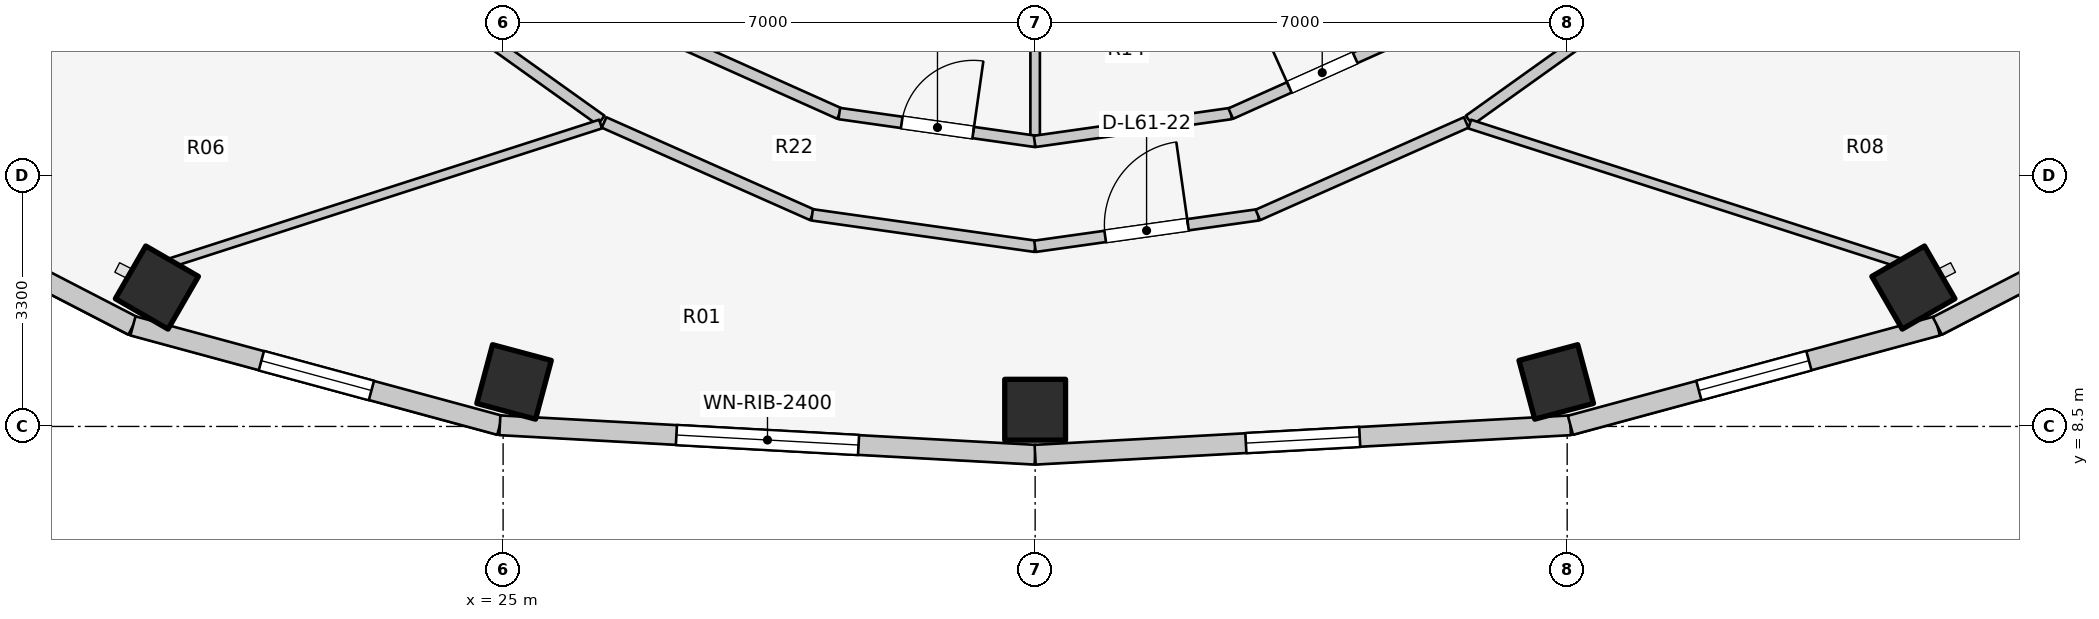
"""IFC4 building model, lengths in metres.
Left out: names, types, materials, properties, quantities, classifications, styles, units other than length and angle.
Written with IfcOpenShell. Run it as: python <this file> out.ifc"""

import sys

from ifc_helpers import new_model, si_unit, direction, frame, frame_2d, origin, origin_2d, place, context, subcontext, project, spatial, rectangle, extrude, element, fill, save


model = new_model("IFC4")
c1 = context("Model", 3, precision=1e-05, world=origin(), true_north=direction((0.0, 1.0)))
c2 = subcontext(c1, "Body", "Model", "MODEL_VIEW")
j1 = project(units=[si_unit("LENGTHUNIT", "METRE"), si_unit("PLANEANGLEUNIT", "RADIAN")], contexts=[c1])
p1 = place(None, origin())
s1 = spatial("IfcSite", under=j1, at=p1, CompositionType="ELEMENT")
p2 = place(p1, origin())
s2 = spatial("IfcBuilding", under=s1, at=p2, CompositionType="ELEMENT")
p3 = place(p2, frame((0.0, 0.0, 201.6)))
s3 = spatial("IfcBuildingStorey", under=s2, at=p3, CompositionType="ELEMENT", Elevation=201.6)
for number, where, z_axis, x_axis in (
    (1, (20.445, 10.327, 0.0), (0.0, 0.0, 1.0), (-0.5, -0.866, 0.0)),
    (2, (25.144, 9.086, 0.0), (0.0, 0.0, 1.0), (-0.259, -0.966, 0.0)),
    (3, (32.0, 8.72, 0.0), (0.0, 0.0, 1.0), (0.0, -1.0, 0.0)),
    (4, (38.856, 9.086, 0.0), (0.0, 0.0, 1.0), (0.259, -0.966, 0.0)),
    (5, (43.555, 10.327, 0.0), (0.0, 0.0, 1.0), (0.5, -0.866, 0.0)),
):
    element("IfcColumn", number, at=place(p3, frame(where, z_axis=z_axis, x_axis=x_axis)), inside=s3, PredefinedType="COLUMN", context=c2, shape_type="SweptSolid", body=[
        extrude(rectangle(XDim=0.8, YDim=0.8, at=origin_2d()), origin(), (0.0, 0.0, 1.0), 3.1),
    ])
p4 = place(p3, frame((16.442, 11.728, 0.0), z_axis=(0.0, 0.0, 1.0), x_axis=(0.88849146803, -0.458893137057, 0.0)))
e6 = element("IfcWall", 6, at=p4, inside=s3, PredefinedType="STANDARD", context=c2, shape_type="SweptSolid", body=[
    extrude(rectangle(XDim=4.15, YDim=0.26, at=frame_2d((2.075, 0.0))), origin(), (0.0, 0.0, 1.0), 2.85),
])
p5 = place(p3, frame((20.13, 9.823, 0.0), z_axis=(0.0, 0.0, 1.0), x_axis=(0.965213026382, -0.261464746576, 0.0)))
e7 = element("IfcWall", 7, at=p5, inside=s3, PredefinedType="STANDARD", context=c2, shape_type="SweptSolid", body=[
    extrude(rectangle(XDim=5.001, YDim=0.26, at=frame_2d((2.5, 0.0))), origin(), (0.0, 0.0, 1.0), 2.85),
])
p6 = place(p5, frame((1.75, 0.0, 0.75)))
e8 = element("IfcOpeningElement", 8, at=p6, cuts=e7, PredefinedType="OPENING", context=c2, shape_type="SweptSolid", body=[
    extrude(rectangle(XDim=1.5, YDim=1.6, at=frame_2d((0.75, 0.8))), frame((0.0, 0.14, 0.0), z_axis=(0.0, -1.0, 0.0), x_axis=(1.0, 0.0, 0.0)), (0.0, 0.0, 1.0), 0.28),
])
p7 = place(p3, frame((24.957, 8.515, 0.0), z_axis=(0.0, 0.0, 1.0), x_axis=(0.998490239527, -0.054929423535, 0.0)))
e9 = element("IfcWall", 9, at=p7, inside=s3, PredefinedType="STANDARD", context=c2, shape_type="SweptSolid", body=[
    extrude(rectangle(XDim=7.054, YDim=0.26, at=frame_2d((3.527, 0.0))), origin(), (0.0, 0.0, 1.0), 2.85),
])
p8 = place(p7, frame((2.327, 0.0, 0.75)))
e10 = element("IfcOpeningElement", 10, at=p8, cuts=e9, PredefinedType="OPENING", context=c2, shape_type="SweptSolid", body=[
    extrude(rectangle(XDim=2.4, YDim=1.7, at=frame_2d((1.2, 0.85))), frame((0.0, 0.14, 0.0), z_axis=(0.0, -1.0, 0.0), x_axis=(1.0, 0.0, 0.0)), (0.0, 0.0, 1.0), 0.28),
])
p9 = place(p3, frame((32.0, 8.128, 0.0), z_axis=(0.0, 0.0, 1.0), x_axis=(0.998490239527, 0.054929423535, 0.0)))
e11 = element("IfcWall", 11, at=p9, inside=s3, PredefinedType="STANDARD", context=c2, shape_type="SweptSolid", body=[
    extrude(rectangle(XDim=7.054, YDim=0.26, at=frame_2d((3.527, 0.0))), origin(), (0.0, 0.0, 1.0), 2.85),
])
p10 = place(p9, frame((2.777, 0.0, 0.75)))
e12 = element("IfcOpeningElement", 12, at=p10, cuts=e11, PredefinedType="OPENING", context=c2, shape_type="SweptSolid", body=[
    extrude(rectangle(XDim=1.5, YDim=1.6, at=frame_2d((0.75, 0.8))), frame((0.0, 0.14, 0.0), z_axis=(0.0, -1.0, 0.0), x_axis=(1.0, 0.0, 0.0)), (0.0, 0.0, 1.0), 0.28),
])
p11 = place(p3, frame((39.043, 8.515, 0.0), z_axis=(0.0, 0.0, 1.0), x_axis=(0.965213026382, 0.261464746576, 0.0)))
e13 = element("IfcWall", 13, at=p11, inside=s3, PredefinedType="STANDARD", context=c2, shape_type="SweptSolid", body=[
    extrude(rectangle(XDim=5.001, YDim=0.26, at=frame_2d((2.5, 0.0))), origin(), (0.0, 0.0, 1.0), 2.85),
])
p12 = place(p11, frame((1.75, 0.0, 0.75)))
e14 = element("IfcOpeningElement", 14, at=p12, cuts=e13, PredefinedType="OPENING", context=c2, shape_type="SweptSolid", body=[
    extrude(rectangle(XDim=1.5, YDim=1.6, at=frame_2d((0.75, 0.8))), frame((0.0, 0.14, 0.0), z_axis=(0.0, -1.0, 0.0), x_axis=(1.0, 0.0, 0.0)), (0.0, 0.0, 1.0), 0.28),
])
p13 = place(p3, frame((43.87, 9.823, 0.0), z_axis=(0.0, 0.0, 1.0), x_axis=(0.88849146803, 0.458893137057, 0.0)))
e15 = element("IfcWall", 15, at=p13, inside=s3, PredefinedType="STANDARD", context=c2, shape_type="SweptSolid", body=[
    extrude(rectangle(XDim=4.15, YDim=0.26, at=frame_2d((2.075, 0.0))), origin(), (0.0, 0.0, 1.0), 2.85),
])
p14 = place(p3, frame((32.0, 14.9, 0.0), z_axis=(0.0, 0.0, 1.0), x_axis=(0.0, -1.0, 0.0)))
e16 = element("IfcWall", 16, at=p14, inside=s3, PredefinedType="PARTITIONING", context=c2, shape_type="SweptSolid", body=[
    extrude(rectangle(XDim=2.65, YDim=0.125, at=frame_2d((1.325, 0.0))), origin(), (0.0, 0.0, 1.0), 2.376),
])
p15 = place(p3, frame((27.019, 13.694, 0.0), z_axis=(0.0, 0.0, 1.0), x_axis=(0.912628408652, -0.408790151203, 0.0)))
e17 = element("IfcWall", 17, at=p15, inside=s3, PredefinedType="PARTITIONING", context=c2, shape_type="SweptSolid", body=[
    extrude(rectangle(XDim=2.638, YDim=0.15, at=frame_2d((1.319, 0.0))), origin(), (0.0, 0.0, 1.0), 2.376),
])
p16 = place(p3, frame((29.423, 12.617, 0.0), z_axis=(0.0, 0.0, 1.0), x_axis=(0.990078185178, -0.140517569133, 0.0)))
e18 = element("IfcWall", 18, at=p16, inside=s3, PredefinedType="PARTITIONING", context=c2, shape_type="SweptSolid", body=[
    extrude(rectangle(XDim=2.61, YDim=0.15, at=frame_2d((1.305, 0.0))), origin(), (0.0, 0.0, 1.0), 2.376),
])
p17 = place(p16, frame((0.83, 0.0, 0.0)))
e19 = element("IfcOpeningElement", 19, at=p17, cuts=e18, PredefinedType="OPENING", context=c2, shape_type="SweptSolid", body=[
    extrude(rectangle(XDim=0.95, YDim=2.1, at=frame_2d((0.475, 1.05))), frame((0.0, 0.085, 0.0), z_axis=(0.0, -1.0, 0.0), x_axis=(1.0, 0.0, 0.0)), (0.0, 0.0, 1.0), 0.17),
])
p18 = place(p3, frame((31.993, 12.25, 0.0), z_axis=(0.0, 0.0, 1.0), x_axis=(0.990078185178, 0.140517569133, 0.0)))
e20 = element("IfcWall", 20, at=p18, inside=s3, PredefinedType="PARTITIONING", context=c2, shape_type="SweptSolid", body=[
    extrude(rectangle(XDim=2.61, YDim=0.15, at=frame_2d((1.305, 0.0))), origin(), (0.0, 0.0, 1.0), 2.376),
])
p19 = place(p3, frame((34.573, 12.616, 0.0), z_axis=(0.0, 0.0, 1.0), x_axis=(0.912628408652, 0.408790151203, 0.0)))
e21 = element("IfcWall", 21, at=p19, inside=s3, PredefinedType="PARTITIONING", context=c2, shape_type="SweptSolid", body=[
    extrude(rectangle(XDim=2.638, YDim=0.15, at=frame_2d((1.319, 0.0))), origin(), (0.0, 0.0, 1.0), 2.376),
])
p20 = place(p19, frame((0.844, 0.0, 0.0)))
e22 = element("IfcOpeningElement", 22, at=p20, cuts=e21, PredefinedType="OPENING", context=c2, shape_type="SweptSolid", body=[
    extrude(rectangle(XDim=0.95, YDim=2.1, at=frame_2d((0.475, 1.05))), frame((0.0, 0.085, 0.0), z_axis=(0.0, -1.0, 0.0), x_axis=(1.0, 0.0, 0.0)), (0.0, 0.0, 1.0), 0.17),
])
for number, where, z_axis, x_axis in (
    (23, (26.29, 12.527, 0.0), (0.0, 0.0, 1.0), (-0.814, 0.581, 0.0)),
    (24, (37.71, 12.527, 0.0), (0.0, 0.0, 1.0), (0.814, 0.581, 0.0)),
):
    element("IfcWall", number, at=place(p3, frame(where, z_axis=z_axis, x_axis=x_axis)), inside=s3, PredefinedType="PARTITIONING", context=c2, shape_type="SweptSolid", body=[
        extrude(rectangle(XDim=2.082, YDim=0.15, at=frame_2d((1.041, 0.0))), origin(), (0.0, 0.0, 1.0), 2.376),
    ])
for number, where, z_axis, x_axis in (
    (25, (26.283, 12.478, 0.0), (0.0, 0.0, 1.0), (-0.952, -0.307, 0.0)),
    (26, (37.717, 12.478, 0.0), (0.0, 0.0, 1.0), (0.952, -0.307, 0.0)),
):
    element("IfcWall", number, at=place(p3, frame(where, z_axis=z_axis, x_axis=x_axis)), inside=s3, PredefinedType="MOVABLE", context=c2, shape_type="SweptSolid", body=[
        extrude(rectangle(XDim=5.934, YDim=0.12, at=frame_2d((2.967, 0.0))), origin(), (0.0, 0.0, 1.0), 2.376),
    ])
p21 = place(p3, frame((26.328, 12.499, 0.0), z_axis=(0.0, 0.0, 1.0), x_axis=(0.914043013008, -0.4056172708, 0.0)))
e27 = element("IfcWall", 27, at=p21, inside=s3, PredefinedType="PARTITIONING", context=c2, shape_type="SweptSolid", body=[
    extrude(rectangle(XDim=2.999, YDim=0.15, at=frame_2d((1.5, 0.0))), origin(), (0.0, 0.0, 1.0), 2.376),
])
p22 = place(p3, frame((29.066, 11.284, 0.0), z_axis=(0.0, 0.0, 1.0), x_axis=(0.990214490255, -0.139553800697, 0.0)))
e28 = element("IfcWall", 28, at=p22, inside=s3, PredefinedType="PARTITIONING", context=c2, shape_type="SweptSolid", body=[
    extrude(rectangle(XDim=2.965, YDim=0.15, at=frame_2d((1.483, 0.0))), origin(), (0.0, 0.0, 1.0), 2.376),
])
p23 = place(p3, frame((31.998, 10.87, 0.0), z_axis=(0.0, 0.0, 1.0), x_axis=(0.990214490255, 0.139553800697, 0.0)))
e29 = element("IfcWall", 29, at=p23, inside=s3, PredefinedType="PARTITIONING", context=c2, shape_type="SweptSolid", body=[
    extrude(rectangle(XDim=2.965, YDim=0.15, at=frame_2d((1.483, 0.0))), origin(), (0.0, 0.0, 1.0), 2.376),
])
p24 = place(p23, frame((0.933, 0.0, 0.0)))
e30 = element("IfcOpeningElement", 30, at=p24, cuts=e29, PredefinedType="OPENING", context=c2, shape_type="SweptSolid", body=[
    extrude(rectangle(XDim=1.1, YDim=2.1, at=frame_2d((0.55, 1.05))), frame((0.0, 0.085, 0.0), z_axis=(0.0, -1.0, 0.0), x_axis=(1.0, 0.0, 0.0)), (0.0, 0.0, 1.0), 0.17),
])
p25 = place(p3, frame((34.93, 11.283, 0.0), z_axis=(0.0, 0.0, 1.0), x_axis=(0.914043013008, 0.4056172708, 0.0)))
e31 = element("IfcWall", 31, at=p25, inside=s3, PredefinedType="PARTITIONING", context=c2, shape_type="SweptSolid", body=[
    extrude(rectangle(XDim=2.999, YDim=0.15, at=frame_2d((1.5, 0.0))), origin(), (0.0, 0.0, 1.0), 2.376),
])
p26 = place(p6, origin())
e32 = element("IfcWindow", 32, at=p26, inside=s3, PartitioningType="SINGLE_PANEL", PredefinedType="WINDOW", context=c2, shape_type="SweptSolid", body=[
    extrude(rectangle(XDim=1.5, YDim=1.6, at=frame_2d((0.75, 0.8))), frame((0.0, 0.03, 0.0), z_axis=(0.0, -1.0, 0.0), x_axis=(1.0, 0.0, 0.0)), (0.0, 0.0, 1.0), 0.06),
])
fill(e8, e32)
p27 = place(p8, origin())
e33 = element("IfcWindow", 33, at=p27, inside=s3, PartitioningType="SINGLE_PANEL", PredefinedType="WINDOW", context=c2, shape_type="SweptSolid", body=[
    extrude(rectangle(XDim=2.4, YDim=1.7, at=frame_2d((1.2, 0.85))), frame((0.0, 0.03, 0.0), z_axis=(0.0, -1.0, 0.0), x_axis=(1.0, 0.0, 0.0)), (0.0, 0.0, 1.0), 0.06),
])
fill(e10, e33)
p28 = place(p10, origin())
e34 = element("IfcWindow", 34, at=p28, inside=s3, PartitioningType="SINGLE_PANEL", PredefinedType="WINDOW", context=c2, shape_type="SweptSolid", body=[
    extrude(rectangle(XDim=1.5, YDim=1.6, at=frame_2d((0.75, 0.8))), frame((0.0, 0.03, 0.0), z_axis=(0.0, -1.0, 0.0), x_axis=(1.0, 0.0, 0.0)), (0.0, 0.0, 1.0), 0.06),
])
fill(e12, e34)
p29 = place(p12, origin())
e35 = element("IfcWindow", 35, at=p29, inside=s3, PartitioningType="SINGLE_PANEL", PredefinedType="WINDOW", context=c2, shape_type="SweptSolid", body=[
    extrude(rectangle(XDim=1.5, YDim=1.6, at=frame_2d((0.75, 0.8))), frame((0.0, 0.03, 0.0), z_axis=(0.0, -1.0, 0.0), x_axis=(1.0, 0.0, 0.0)), (0.0, 0.0, 1.0), 0.06),
])
fill(e14, e35)
p30 = place(p17, origin())
e36 = element("IfcDoor", 36, at=p30, inside=s3, OperationType="SINGLE_SWING_RIGHT", PredefinedType="DOOR", context=c2, shape_type="SweptSolid", body=[
    extrude(rectangle(XDim=0.95, YDim=2.1, at=frame_2d((0.475, 1.05))), frame((0.0, 0.025, 0.0), z_axis=(0.0, -1.0, 0.0), x_axis=(1.0, 0.0, 0.0)), (0.0, 0.0, 1.0), 0.05),
])
fill(e19, e36)
p31 = place(p20, origin())
e37 = element("IfcDoor", 37, at=p31, inside=s3, OperationType="SINGLE_SWING_LEFT", PredefinedType="DOOR", context=c2, shape_type="SweptSolid", body=[
    extrude(rectangle(XDim=0.95, YDim=2.1, at=frame_2d((0.475, 1.05))), frame((0.0, 0.025, 0.0), z_axis=(0.0, -1.0, 0.0), x_axis=(1.0, 0.0, 0.0)), (0.0, 0.0, 1.0), 0.05),
])
fill(e22, e37)
p32 = place(p24, origin())
e38 = element("IfcDoor", 38, at=p32, inside=s3, OperationType="SINGLE_SWING_RIGHT", PredefinedType="DOOR", context=c2, shape_type="SweptSolid", body=[
    extrude(rectangle(XDim=1.1, YDim=2.1, at=frame_2d((0.55, 1.05))), frame((0.0, 0.025, 0.0), z_axis=(0.0, -1.0, 0.0), x_axis=(1.0, 0.0, 0.0)), (0.0, 0.0, 1.0), 0.05),
])
fill(e30, e38)
save(model, sys.argv[1])
